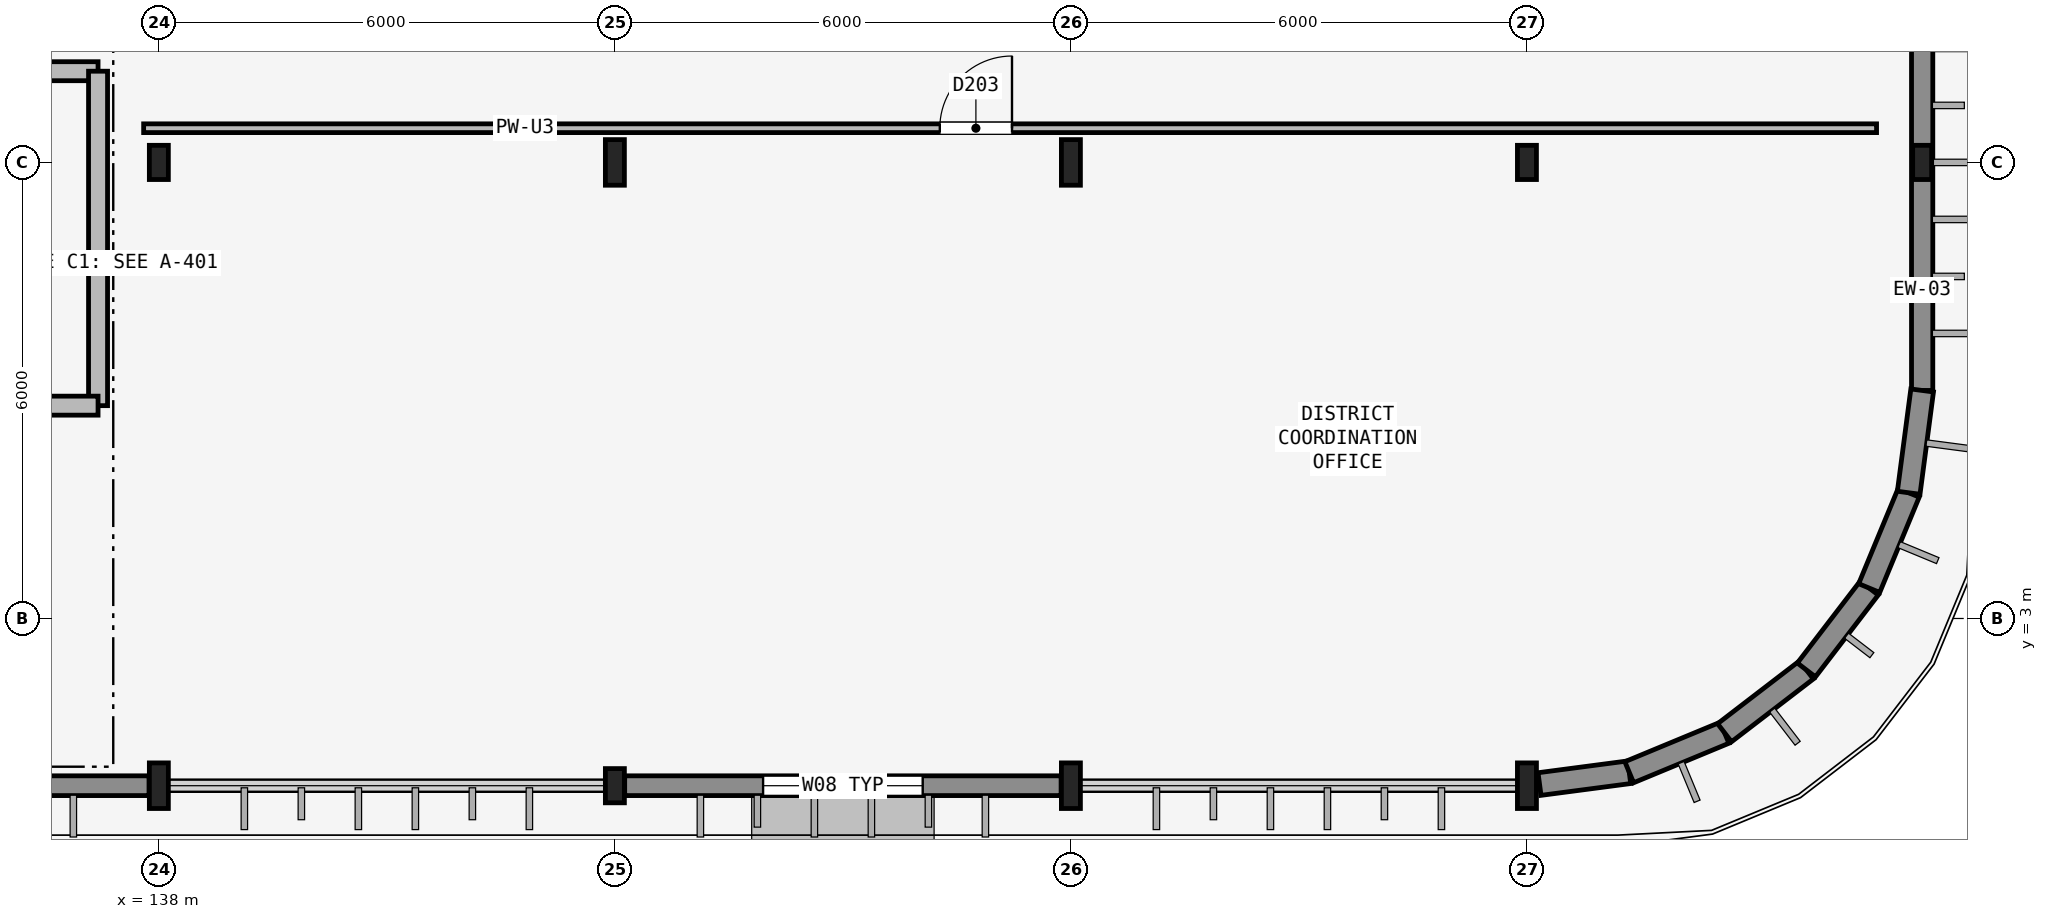
"""IFC4 building model, lengths in metres.
Left out: names, types, materials, properties, quantities, classifications, styles, units other than length and angle.
Written with IfcOpenShell. Run it as: python <this file> out.ifc"""

import sys

from ifc_helpers import new_model, si_unit, direction, frame, frame_2d, origin, origin_2d, place, context, subcontext, project, spatial, rectangle, i_section, extrude, element, fill, save


model = new_model("IFC4")
c1 = context("Model", 3, precision=1e-05, world=origin(), true_north=direction((0.0, 1.0)))
c2 = subcontext(c1, "Body", "Model", "MODEL_VIEW")
j1 = project(units=[si_unit("LENGTHUNIT", "METRE"), si_unit("PLANEANGLEUNIT", "RADIAN")], contexts=[c1])
p1 = place(None, origin())
s1 = spatial("IfcSite", under=j1, at=p1, CompositionType="ELEMENT")
p2 = place(p1, origin())
s2 = spatial("IfcBuilding", under=s1, at=p2, CompositionType="ELEMENT")
p3 = place(p2, frame((0.0, 0.0, 4.8)))
s3 = spatial("IfcBuildingStorey", under=s2, at=p3, CompositionType="ELEMENT", Elevation=4.8)
p4 = place(p3, frame((138.0, 0.8, 0.0), z_axis=(0.0, 0.0, 1.0), x_axis=(1.0, 0.0, 0.0)))
e1 = element("IfcColumn", 1, at=p4, inside=s3, PredefinedType="COLUMN", context=c2, shape_type="SweptSolid", body=[
    extrude(i_section(OverallWidth=0.25, OverallDepth=0.6, WebThickness=0.012, FlangeThickness=0.024, FilletRadius=0.017, at=origin_2d()), origin(), (0.0, 0.0, 1.0), 4.5),
])
for number, where, z_axis, x_axis in (
    (2, (138.0, 9.0, 0.0), (0.0, 0.0, 1.0), (1.0, 0.0, 0.0)),
    (3, (144.0, 0.8, 0.0), (0.0, 0.0, 1.0), (1.0, 0.0, 0.0)),
):
    element("IfcColumn", number, at=place(p3, frame(where, z_axis=z_axis, x_axis=x_axis)), inside=s3, PredefinedType="COLUMN", context=c2, shape_type="SweptSolid", body=[
        extrude(i_section(OverallWidth=0.25, OverallDepth=0.45, WebThickness=0.011, FlangeThickness=0.014, FilletRadius=0.015, at=origin_2d()), origin(), (0.0, 0.0, 1.0), 4.5),
    ])
for number, where, z_axis, x_axis in (
    (4, (144.0, 9.0, 0.0), (0.0, 0.0, 1.0), (1.0, 0.0, 0.0)),
    (5, (150.0, 0.8, 0.0), (0.0, 0.0, 1.0), (1.0, 0.0, 0.0)),
    (6, (150.0, 9.0, 0.0), (0.0, 0.0, 1.0), (1.0, 0.0, 0.0)),
    (7, (156.0, 0.8, 0.0), (0.0, 0.0, 1.0), (1.0, 0.0, 0.0)),
):
    element("IfcColumn", number, at=place(p3, frame(where, z_axis=z_axis, x_axis=x_axis)), inside=s3, PredefinedType="COLUMN", context=c2, shape_type="SweptSolid", body=[
        extrude(i_section(OverallWidth=0.25, OverallDepth=0.6, WebThickness=0.012, FlangeThickness=0.024, FilletRadius=0.017, at=origin_2d()), origin(), (0.0, 0.0, 1.0), 4.5),
    ])
for number, where, z_axis, x_axis in (
    (8, (156.0, 9.0, 0.0), (0.0, 0.0, 1.0), (1.0, 0.0, 0.0)),
    (9, (161.2, 9.0, 0.0), (0.0, 0.0, 1.0), (1.0, 0.0, 0.0)),
):
    element("IfcColumn", number, at=place(p3, frame(where, z_axis=z_axis, x_axis=x_axis)), inside=s3, PredefinedType="COLUMN", context=c2, shape_type="SweptSolid", body=[
        extrude(i_section(OverallWidth=0.25, OverallDepth=0.45, WebThickness=0.011, FlangeThickness=0.014, FilletRadius=0.015, at=origin_2d()), origin(), (0.0, 0.0, 1.0), 4.5),
    ])
p5 = place(p3, frame((132.129, 0.8, 0.0), z_axis=(0.0, 0.0, 1.0), x_axis=(1.0, 0.0, 0.0)))
e10 = element("IfcWall", 10, at=p5, inside=s3, PredefinedType="SOLIDWALL", context=c2, shape_type="SweptSolid", body=[
    extrude(rectangle(XDim=5.742, YDim=0.26, at=frame_2d((2.871, 0.0))), origin(), (0.0, 0.0, 1.0), 3.79),
])
p6 = place(p5, frame((1.671, 0.0, 1.1)))
e11 = element("IfcOpeningElement", 11, at=p6, cuts=e10, PredefinedType="OPENING", context=c2, shape_type="SweptSolid", body=[
    extrude(rectangle(XDim=2.4, YDim=1.2, at=frame_2d((1.2, 0.6))), frame((0.0, 0.14, 0.0), z_axis=(0.0, -1.0, 0.0), x_axis=(1.0, 0.0, 0.0)), (0.0, 0.0, 1.0), 0.28),
])
p7 = place(p3, frame((144.129, 0.8, 0.0), z_axis=(0.0, 0.0, 1.0), x_axis=(1.0, 0.0, 0.0)))
e12 = element("IfcWall", 12, at=p7, inside=s3, PredefinedType="SOLIDWALL", context=c2, shape_type="SweptSolid", body=[
    extrude(rectangle(XDim=5.742, YDim=0.26, at=frame_2d((2.871, 0.0))), origin(), (0.0, 0.0, 1.0), 3.79),
])
p8 = place(p7, frame((1.821, 0.0, 0.9)))
e13 = element("IfcOpeningElement", 13, at=p8, cuts=e12, PredefinedType="OPENING", context=c2, shape_type="SweptSolid", body=[
    extrude(rectangle(XDim=2.1, YDim=1.5, at=frame_2d((1.05, 0.75))), frame((0.0, 0.14, 0.0), z_axis=(0.0, -1.0, 0.0), x_axis=(1.0, 0.0, 0.0)), (0.0, 0.0, 1.0), 0.28),
])
p9 = place(p3, frame((161.2, 6.0, 0.0), z_axis=(0.0, 0.0, 1.0), x_axis=(0.0, 1.0, 0.0)))
e14 = element("IfcWall", 14, at=p9, inside=s3, PredefinedType="SOLIDWALL", context=c2, shape_type="SweptSolid", body=[
    extrude(rectangle(XDim=6.0, YDim=0.28, at=frame_2d((3.0, 0.0))), origin(), (0.0, 0.0, 1.0), 3.74),
])
p10 = place(p3, frame((156.166, 0.822, 0.0), z_axis=(0.0, 0.0, 1.0), x_axis=(0.991429146379, 0.130645503981, 0.0)))
e15 = element("IfcWall", 15, at=p10, inside=s3, PredefinedType="SOLIDWALL", context=c2, shape_type="SweptSolid", body=[
    extrude(rectangle(XDim=1.19, YDim=0.3, at=frame_2d((0.595, 0.0))), origin(), (0.0, 0.0, 1.0), 3.79),
])
for number, where, z_axis, x_axis in (
    (16, (157.346, 0.977, 0.0), (0.0, 0.0, 1.0), (0.924, 0.383, 0.0)),
    (17, (158.6, 1.497, 0.0), (0.0, 0.0, 1.0), (0.793, 0.609, 0.0)),
    (18, (159.677, 2.323, 0.0), (0.0, 0.0, 1.0), (0.609, 0.793, 0.0)),
    (19, (160.503, 3.4, 0.0), (0.0, 0.0, 1.0), (0.383, 0.924, 0.0)),
):
    element("IfcWall", number, at=place(p3, frame(where, z_axis=z_axis, x_axis=x_axis)), inside=s3, PredefinedType="SOLIDWALL", context=c2, shape_type="SweptSolid", body=[
        extrude(rectangle(XDim=1.357, YDim=0.3, at=frame_2d((0.679, 0.0))), origin(), (0.0, 0.0, 1.0), 4.195),
    ])
p11 = place(p3, frame((161.023, 4.654, 0.0), z_axis=(0.0, 0.0, 1.0), x_axis=(0.130561507967, 0.991440211328, 0.0)))
e20 = element("IfcWall", 20, at=p11, inside=s3, PredefinedType="SOLIDWALL", context=c2, shape_type="SweptSolid", body=[
    extrude(rectangle(XDim=1.358, YDim=0.3, at=frame_2d((0.679, 0.0))), origin(), (0.0, 0.0, 1.0), 4.195),
])
p12 = place(p3, frame((131.55, 10.2, 0.0), z_axis=(0.0, 0.0, 1.0), x_axis=(1.0, 0.0, 0.0)))
e21 = element("IfcWall", 21, at=p12, inside=s3, PredefinedType="PARTITIONING", context=c2, shape_type="SweptSolid", body=[
    extrude(rectangle(XDim=5.65, YDim=0.25, at=frame_2d((2.825, 0.0))), origin(), (0.0, 0.0, 1.0), 3.783),
])
p13 = place(p12, frame((2.075, 0.0, 0.0)))
e22 = element("IfcOpeningElement", 22, at=p13, cuts=e21, PredefinedType="OPENING", context=c2, shape_type="SweptSolid", body=[
    extrude(rectangle(XDim=1.5, YDim=2.15, at=frame_2d((0.75, 1.075))), frame((0.0, 0.135, 0.0), z_axis=(0.0, -1.0, 0.0), x_axis=(1.0, 0.0, 0.0)), (0.0, 0.0, 1.0), 0.27),
])
p14 = place(p3, frame((137.2, 5.8, 0.0), z_axis=(0.0, 0.0, 1.0), x_axis=(0.0, 1.0, 0.0)))
e23 = element("IfcWall", 23, at=p14, inside=s3, PredefinedType="PARTITIONING", context=c2, shape_type="SweptSolid", body=[
    extrude(rectangle(XDim=4.4, YDim=0.25, at=frame_2d((2.2, 0.0))), origin(), (0.0, 0.0, 1.0), 3.59),
])
p15 = place(p3, frame((135.6, 5.8, 0.0), z_axis=(0.0, 0.0, 1.0), x_axis=(1.0, 0.0, 0.0)))
e24 = element("IfcWall", 24, at=p15, inside=s3, PredefinedType="PARTITIONING", context=c2, shape_type="SweptSolid", body=[
    extrude(rectangle(XDim=1.6, YDim=0.25, at=frame_2d((0.8, 0.0))), origin(), (0.0, 0.0, 1.0), 4.19),
])
p16 = place(p3, frame((137.8, 9.45, 0.0), z_axis=(0.0, 0.0, 1.0), x_axis=(1.0, 0.0, 0.0)))
e25 = element("IfcWall", 25, at=p16, inside=s3, PredefinedType="PARTITIONING", context=c2, shape_type="SweptSolid", body=[
    extrude(rectangle(XDim=22.8, YDim=0.115, at=frame_2d((11.4, 0.0))), origin(), (0.0, 0.0, 1.0), 3.783),
])
p17 = place(p16, frame((10.475, 0.0, 0.0)))
e26 = element("IfcOpeningElement", 26, at=p17, cuts=e25, PredefinedType="OPENING", context=c2, shape_type="SweptSolid", body=[
    extrude(rectangle(XDim=0.95, YDim=2.15, at=frame_2d((0.475, 1.075))), frame((0.0, 0.067, 0.0), z_axis=(0.0, -1.0, 0.0), x_axis=(1.0, 0.0, 0.0)), (0.0, 0.0, 1.0), 0.135),
])
p18 = place(p8, origin())
e27 = element("IfcWindow", 27, at=p18, inside=s3, PartitioningType="SINGLE_PANEL", PredefinedType="WINDOW", context=c2, shape_type="SweptSolid", body=[
    extrude(rectangle(XDim=2.1, YDim=1.5, at=frame_2d((1.05, 0.75))), frame((0.0, 0.03, 0.0), z_axis=(0.0, -1.0, 0.0), x_axis=(1.0, 0.0, 0.0)), (0.0, 0.0, 1.0), 0.06),
])
fill(e13, e27)
p19 = place(p17, origin())
e28 = element("IfcDoor", 28, at=p19, inside=s3, OperationType="SINGLE_SWING_RIGHT", PredefinedType="DOOR", context=c2, shape_type="SweptSolid", body=[
    extrude(rectangle(XDim=0.95, YDim=2.15, at=frame_2d((0.475, 1.075))), frame((0.0, 0.025, 0.0), z_axis=(0.0, -1.0, 0.0), x_axis=(1.0, 0.0, 0.0)), (0.0, 0.0, 1.0), 0.05),
])
fill(e26, e28)
save(model, sys.argv[1])
